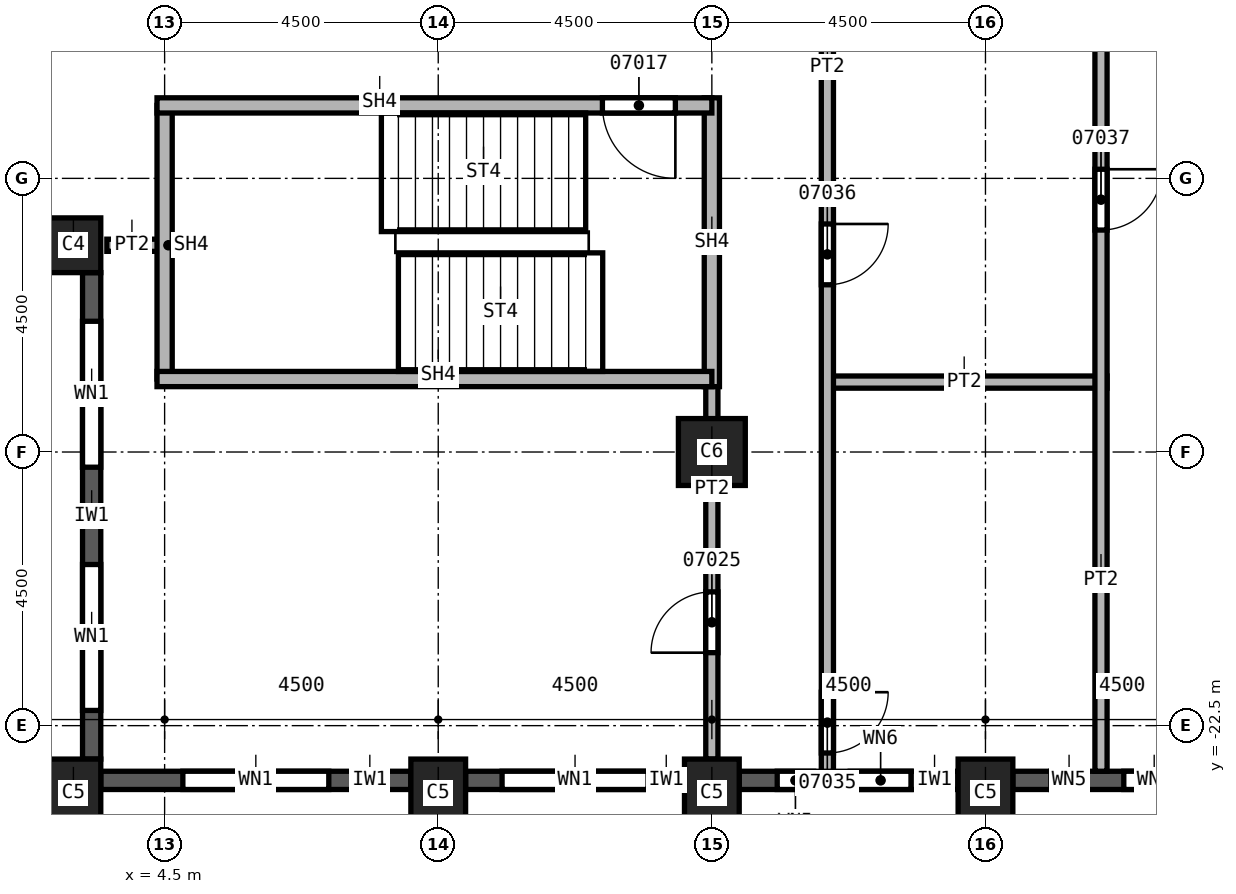
"""IFC4 building model, lengths in metres.
Left out: names, types, materials, properties, quantities, classifications, styles, units other than length and angle.
Written with IfcOpenShell. Run it as: python <this file> out.ifc"""

import sys

from ifc_helpers import new_model, si_unit, direction, frame, frame_2d, origin, origin_2d, place, context, subcontext, project, spatial, rectangle, extrude, element, fill, save


model = new_model("IFC4")
c1 = context("Model", 3, precision=1e-05, world=origin(), true_north=direction((0.0, 1.0)))
c2 = subcontext(c1, "Body", "Model", "MODEL_VIEW")
j1 = project(units=[si_unit("LENGTHUNIT", "METRE"), si_unit("PLANEANGLEUNIT", "RADIAN")], contexts=[c1])
p1 = place(None, origin())
s1 = spatial("IfcSite", under=j1, at=p1, CompositionType="ELEMENT")
p2 = place(p1, origin())
s2 = spatial("IfcBuilding", under=s1, at=p2, CompositionType="ELEMENT")
p3 = place(p2, frame((0.0, 0.0, 138.0)))
s3 = spatial("IfcBuildingStorey", under=s2, at=p3, CompositionType="ELEMENT", Elevation=138.0)
p4 = place(p3, frame((13.5, -18.0, 0.0), z_axis=(0.0, 0.0, 1.0), x_axis=(1.0, 0.0, 0.0)))
e1 = element("IfcColumn", 1, at=p4, inside=s3, PredefinedType="COLUMN", context=c2, shape_type="SweptSolid", body=[
    extrude(rectangle(XDim=1.1, YDim=1.1, at=origin_2d()), origin(), (0.0, 0.0, 1.0), 3.7),
])
for number, where, z_axis, x_axis in (
    (2, (3.0, -23.6, 0.0), (0.0, 0.0, 1.0), (1.0, 0.0, 0.0)),
    (3, (9.0, -23.6, 0.0), (0.0, 0.0, 1.0), (1.0, 0.0, 0.0)),
    (4, (13.5, -23.6, 0.0), (0.0, 0.0, 1.0), (1.0, 0.0, 0.0)),
    (5, (18.0, -23.6, 0.0), (0.0, 0.0, 1.0), (1.0, 0.0, 0.0)),
):
    element("IfcColumn", number, at=place(p3, frame(where, z_axis=z_axis, x_axis=x_axis)), inside=s3, PredefinedType="COLUMN", context=c2, shape_type="SweptSolid", body=[
        extrude(rectangle(XDim=0.9, YDim=1.1, at=origin_2d()), origin(), (0.0, 0.0, 1.0), 3.7),
    ])
p5 = place(p3, frame((3.0, -14.6, 0.0), z_axis=(0.0, 0.0, 1.0), x_axis=(1.0, 0.0, 0.0)))
e6 = element("IfcColumn", 6, at=p5, inside=s3, PredefinedType="COLUMN", context=c2, shape_type="SweptSolid", body=[
    extrude(rectangle(XDim=0.9, YDim=0.9, at=origin_2d()), origin(), (0.0, 0.0, 1.0), 3.7),
])
p6 = place(p3, frame((3.3, -15.05, 0.0), z_axis=(0.0, 0.0, 1.0), x_axis=(0.0, -1.0, 0.0)))
e7 = element("IfcWall", 7, at=p6, inside=s3, PredefinedType="SOLIDWALL", context=c2, shape_type="SweptSolid", body=[
    extrude(rectangle(XDim=8.0, YDim=0.3, at=frame_2d((4.0, 0.0))), origin(), (0.0, 0.0, 1.0), 3.1),
])
p7 = place(p6, frame((0.8, 0.0, 0.8)))
e8 = element("IfcOpeningElement", 8, at=p7, cuts=e7, PredefinedType="OPENING", context=c2, shape_type="SweptSolid", body=[
    extrude(rectangle(XDim=2.4, YDim=1.95, at=frame_2d((1.2, 0.975))), frame((0.0, 0.15, 0.0), z_axis=(0.0, -1.0, 0.0), x_axis=(1.0, 0.0, 0.0)), (0.0, 0.0, 1.0), 0.3),
])
p8 = place(p6, frame((4.8, 0.0, 0.8)))
e9 = element("IfcOpeningElement", 9, at=p8, cuts=e7, PredefinedType="OPENING", context=c2, shape_type="SweptSolid", body=[
    extrude(rectangle(XDim=2.4, YDim=1.95, at=frame_2d((1.2, 0.975))), frame((0.0, 0.15, 0.0), z_axis=(0.0, -1.0, 0.0), x_axis=(1.0, 0.0, 0.0)), (0.0, 0.0, 1.0), 0.3),
])
p9 = place(p3, frame((3.45, -23.4, 0.0), z_axis=(0.0, 0.0, 1.0), x_axis=(1.0, 0.0, 0.0)))
e10 = element("IfcWall", 10, at=p9, inside=s3, PredefinedType="SOLIDWALL", context=c2, shape_type="SweptSolid", body=[
    extrude(rectangle(XDim=5.1, YDim=0.3, at=frame_2d((2.55, 0.0))), origin(), (0.0, 0.0, 1.0), 3.1),
])
p10 = place(p9, frame((1.35, 0.0, 0.8)))
e11 = element("IfcOpeningElement", 11, at=p10, cuts=e10, PredefinedType="OPENING", context=c2, shape_type="SweptSolid", body=[
    extrude(rectangle(XDim=2.4, YDim=1.95, at=frame_2d((1.2, 0.975))), frame((0.0, 0.15, 0.0), z_axis=(0.0, -1.0, 0.0), x_axis=(1.0, 0.0, 0.0)), (0.0, 0.0, 1.0), 0.3),
])
p11 = place(p3, frame((9.45, -23.4, 0.0), z_axis=(0.0, 0.0, 1.0), x_axis=(1.0, 0.0, 0.0)))
e12 = element("IfcWall", 12, at=p11, inside=s3, PredefinedType="SOLIDWALL", context=c2, shape_type="SweptSolid", body=[
    extrude(rectangle(XDim=3.6, YDim=0.3, at=frame_2d((1.8, 0.0))), origin(), (0.0, 0.0, 1.0), 3.1),
])
p12 = place(p11, frame((0.6, 0.0, 0.8)))
e13 = element("IfcOpeningElement", 13, at=p12, cuts=e12, PredefinedType="OPENING", context=c2, shape_type="SweptSolid", body=[
    extrude(rectangle(XDim=2.4, YDim=1.95, at=frame_2d((1.2, 0.975))), frame((0.0, 0.15, 0.0), z_axis=(0.0, -1.0, 0.0), x_axis=(1.0, 0.0, 0.0)), (0.0, 0.0, 1.0), 0.3),
])
p13 = place(p3, frame((13.95, -23.4, 0.0), z_axis=(0.0, 0.0, 1.0), x_axis=(1.0, 0.0, 0.0)))
e14 = element("IfcWall", 14, at=p13, inside=s3, PredefinedType="SOLIDWALL", context=c2, shape_type="SweptSolid", body=[
    extrude(rectangle(XDim=3.6, YDim=0.3, at=frame_2d((1.8, 0.0))), origin(), (0.0, 0.0, 1.0), 3.1),
])
p14 = place(p13, frame((0.625, 0.0, 0.8)))
e15 = element("IfcOpeningElement", 15, at=p14, cuts=e14, PredefinedType="OPENING", context=c2, shape_type="SweptSolid", body=[
    extrude(rectangle(XDim=0.6, YDim=1.95, at=frame_2d((0.3, 0.975))), frame((0.0, 0.15, 0.0), z_axis=(0.0, -1.0, 0.0), x_axis=(1.0, 0.0, 0.0)), (0.0, 0.0, 1.0), 0.3),
])
p15 = place(p13, frame((1.825, 0.0, 0.8)))
e16 = element("IfcOpeningElement", 16, at=p15, cuts=e14, PredefinedType="OPENING", context=c2, shape_type="SweptSolid", body=[
    extrude(rectangle(XDim=1.0, YDim=1.95, at=frame_2d((0.5, 0.975))), frame((0.0, 0.15, 0.0), z_axis=(0.0, -1.0, 0.0), x_axis=(1.0, 0.0, 0.0)), (0.0, 0.0, 1.0), 0.3),
])
p16 = place(p3, frame((18.45, -23.4, 0.0), z_axis=(0.0, 0.0, 1.0), x_axis=(1.0, 0.0, 0.0)))
e17 = element("IfcWall", 17, at=p16, inside=s3, PredefinedType="SOLIDWALL", context=c2, shape_type="SweptSolid", body=[
    extrude(rectangle(XDim=3.6, YDim=0.3, at=frame_2d((1.8, 0.0))), origin(), (0.0, 0.0, 1.0), 3.1),
])
p17 = place(p16, frame((0.625, 0.0, 0.8)))
e18 = element("IfcOpeningElement", 18, at=p17, cuts=e17, PredefinedType="OPENING", context=c2, shape_type="SweptSolid", body=[
    extrude(rectangle(XDim=0.6, YDim=1.95, at=frame_2d((0.3, 0.975))), frame((0.0, 0.15, 0.0), z_axis=(0.0, -1.0, 0.0), x_axis=(1.0, 0.0, 0.0)), (0.0, 0.0, 1.0), 0.3),
])
p18 = place(p16, frame((1.825, 0.0, 0.8)))
e19 = element("IfcOpeningElement", 19, at=p18, cuts=e17, PredefinedType="OPENING", context=c2, shape_type="SweptSolid", body=[
    extrude(rectangle(XDim=1.0, YDim=1.95, at=frame_2d((0.5, 0.975))), frame((0.0, 0.15, 0.0), z_axis=(0.0, -1.0, 0.0), x_axis=(1.0, 0.0, 0.0)), (0.0, 0.0, 1.0), 0.3),
])
p19 = place(p3, frame((4.5, -14.6, 0.0), z_axis=(0.0, 0.0, 1.0), x_axis=(-1.0, 0.0, 0.0)))
e20 = element("IfcWall", 20, at=p19, inside=s3, PredefinedType="PARTITIONING", context=c2, shape_type="SweptSolid", body=[
    extrude(rectangle(XDim=0.95, YDim=0.2, at=frame_2d((0.475, 0.0))), origin(), (0.0, 0.0, 1.0), 3.7),
])
p20 = place(p3, frame((13.5, -23.05, 0.0), z_axis=(0.0, 0.0, 1.0), x_axis=(0.0, 1.0, 0.0)))
e21 = element("IfcWall", 21, at=p20, inside=s3, PredefinedType="PARTITIONING", context=c2, shape_type="SweptSolid", body=[
    extrude(rectangle(XDim=6.375, YDim=0.2, at=frame_2d((3.188, 0.0))), origin(), (0.0, 0.0, 1.0), 3.7),
])
p21 = place(p20, frame((1.75, 0.0, 0.0)))
e22 = element("IfcOpeningElement", 22, at=p21, cuts=e21, PredefinedType="OPENING", context=c2, shape_type="SweptSolid", body=[
    extrude(rectangle(XDim=1.0, YDim=2.1, at=frame_2d((0.5, 1.05))), frame((0.0, 0.1, 0.0), z_axis=(0.0, -1.0, 0.0), x_axis=(1.0, 0.0, 0.0)), (0.0, 0.0, 1.0), 0.2),
])
p22 = place(p3, frame((15.4, -16.85, 0.0), z_axis=(0.0, 0.0, 1.0), x_axis=(1.0, 0.0, 0.0)))
e23 = element("IfcWall", 23, at=p22, inside=s3, PredefinedType="PARTITIONING", context=c2, shape_type="SweptSolid", body=[
    extrude(rectangle(XDim=4.6, YDim=0.2, at=frame_2d((2.3, 0.0))), origin(), (0.0, 0.0, 1.0), 3.7),
])
p23 = place(p3, frame((15.4, -3.65, 0.0), z_axis=(0.0, 0.0, 1.0), x_axis=(0.0, -1.0, 0.0)))
e24 = element("IfcWall", 24, at=p23, inside=s3, PredefinedType="PARTITIONING", context=c2, shape_type="SweptSolid", body=[
    extrude(rectangle(XDim=19.6, YDim=0.2, at=frame_2d((9.8, 0.0))), origin(), (0.0, 0.0, 1.0), 3.7),
])
p24 = place(p23, frame((18.3, 0.0, 0.0)))
e25 = element("IfcOpeningElement", 25, at=p24, cuts=e24, PredefinedType="OPENING", context=c2, shape_type="SweptSolid", body=[
    extrude(rectangle(XDim=1.0, YDim=2.1, at=frame_2d((0.5, 1.05))), frame((0.0, 0.1, 0.0), z_axis=(0.0, -1.0, 0.0), x_axis=(1.0, 0.0, 0.0)), (0.0, 0.0, 1.0), 0.2),
])
p25 = place(p23, frame((10.6, 0.0, 0.0)))
e26 = element("IfcOpeningElement", 26, at=p25, cuts=e24, PredefinedType="OPENING", context=c2, shape_type="SweptSolid", body=[
    extrude(rectangle(XDim=1.0, YDim=2.1, at=frame_2d((0.5, 1.05))), frame((0.0, 0.1, 0.0), z_axis=(0.0, -1.0, 0.0), x_axis=(1.0, 0.0, 0.0)), (0.0, 0.0, 1.0), 0.2),
])
p26 = place(p23, frame((2.2, 0.0, 0.0)))
e27 = element("IfcOpeningElement", 27, at=p26, cuts=e24, PredefinedType="OPENING", context=c2, shape_type="SweptSolid", body=[
    extrude(rectangle(XDim=1.0, YDim=2.1, at=frame_2d((0.5, 1.05))), frame((0.0, 0.1, 0.0), z_axis=(0.0, -1.0, 0.0), x_axis=(1.0, 0.0, 0.0)), (0.0, 0.0, 1.0), 0.2),
])
p27 = place(p3, frame((19.9, -8.9, 0.0), z_axis=(0.0, 0.0, 1.0), x_axis=(0.0, -1.0, 0.0)))
e28 = element("IfcWall", 28, at=p27, inside=s3, PredefinedType="PARTITIONING", context=c2, shape_type="SweptSolid", body=[
    extrude(rectangle(XDim=14.35, YDim=0.2, at=frame_2d((7.175, 0.0))), origin(), (0.0, 0.0, 1.0), 3.7),
])
p28 = place(p27, frame((4.45, 0.0, 0.0)))
e29 = element("IfcOpeningElement", 29, at=p28, cuts=e28, PredefinedType="OPENING", context=c2, shape_type="SweptSolid", body=[
    extrude(rectangle(XDim=1.0, YDim=2.1, at=frame_2d((0.5, 1.05))), frame((0.0, 0.1, 0.0), z_axis=(0.0, -1.0, 0.0), x_axis=(1.0, 0.0, 0.0)), (0.0, 0.0, 1.0), 0.2),
])
p29 = place(p3, frame((4.5, -16.8, 0.0), z_axis=(0.0, 0.0, 1.0), x_axis=(0.0, 1.0, 0.0)))
e30 = element("IfcWall", 30, at=p29, inside=s3, PredefinedType="SOLIDWALL", context=c2, shape_type="SweptSolid", body=[
    extrude(rectangle(XDim=4.5, YDim=0.25, at=frame_2d((2.25, 0.0))), origin(), (0.0, 0.0, 1.0), 3.7),
])
p30 = place(p3, frame((13.5, -16.925, 0.0), z_axis=(0.0, 0.0, 1.0), x_axis=(0.0, 1.0, 0.0)))
e31 = element("IfcWall", 31, at=p30, inside=s3, PredefinedType="SOLIDWALL", context=c2, shape_type="SweptSolid", body=[
    extrude(rectangle(XDim=4.75, YDim=0.25, at=frame_2d((2.375, 0.0))), origin(), (0.0, 0.0, 1.0), 3.7),
])
p31 = place(p3, frame((13.5, -16.8, 0.0), z_axis=(0.0, 0.0, 1.0), x_axis=(-1.0, 0.0, 0.0)))
e32 = element("IfcWall", 32, at=p31, inside=s3, PredefinedType="SOLIDWALL", context=c2, shape_type="SweptSolid", body=[
    extrude(rectangle(XDim=9.125, YDim=0.25, at=frame_2d((4.562, 0.0))), origin(), (0.0, 0.0, 1.0), 3.7),
])
p32 = place(p3, frame((13.5, -12.3, 0.0), z_axis=(0.0, 0.0, 1.0), x_axis=(-1.0, 0.0, 0.0)))
e33 = element("IfcWall", 33, at=p32, inside=s3, PredefinedType="SOLIDWALL", context=c2, shape_type="SweptSolid", body=[
    extrude(rectangle(XDim=9.125, YDim=0.25, at=frame_2d((4.562, 0.0))), origin(), (0.0, 0.0, 1.0), 3.7),
])
p33 = place(p32, frame((0.6, 0.0, 0.0)))
e34 = element("IfcOpeningElement", 34, at=p33, cuts=e33, PredefinedType="OPENING", context=c2, shape_type="SweptSolid", body=[
    extrude(rectangle(XDim=1.2, YDim=2.1, at=frame_2d((0.6, 1.05))), frame((0.0, 0.125, 0.0), z_axis=(0.0, -1.0, 0.0), x_axis=(1.0, 0.0, 0.0)), (0.0, 0.0, 1.0), 0.25),
])
p34 = place(p7, origin())
e35 = element("IfcWindow", 35, at=p34, inside=s3, PartitioningType="SINGLE_PANEL", PredefinedType="WINDOW", context=c2, shape_type="SweptSolid", body=[
    extrude(rectangle(XDim=2.4, YDim=1.95, at=frame_2d((1.2, 0.975))), frame((0.0, 0.03, 0.0), z_axis=(0.0, -1.0, 0.0), x_axis=(1.0, 0.0, 0.0)), (0.0, 0.0, 1.0), 0.06),
])
fill(e8, e35)
p35 = place(p8, origin())
e36 = element("IfcWindow", 36, at=p35, inside=s3, PartitioningType="SINGLE_PANEL", PredefinedType="WINDOW", context=c2, shape_type="SweptSolid", body=[
    extrude(rectangle(XDim=2.4, YDim=1.95, at=frame_2d((1.2, 0.975))), frame((0.0, 0.03, 0.0), z_axis=(0.0, -1.0, 0.0), x_axis=(1.0, 0.0, 0.0)), (0.0, 0.0, 1.0), 0.06),
])
fill(e9, e36)
p36 = place(p10, origin())
e37 = element("IfcWindow", 37, at=p36, inside=s3, PartitioningType="SINGLE_PANEL", PredefinedType="WINDOW", context=c2, shape_type="SweptSolid", body=[
    extrude(rectangle(XDim=2.4, YDim=1.95, at=frame_2d((1.2, 0.975))), frame((0.0, 0.03, 0.0), z_axis=(0.0, -1.0, 0.0), x_axis=(1.0, 0.0, 0.0)), (0.0, 0.0, 1.0), 0.06),
])
fill(e11, e37)
p37 = place(p12, origin())
e38 = element("IfcWindow", 38, at=p37, inside=s3, PartitioningType="SINGLE_PANEL", PredefinedType="WINDOW", context=c2, shape_type="SweptSolid", body=[
    extrude(rectangle(XDim=2.4, YDim=1.95, at=frame_2d((1.2, 0.975))), frame((0.0, 0.03, 0.0), z_axis=(0.0, -1.0, 0.0), x_axis=(1.0, 0.0, 0.0)), (0.0, 0.0, 1.0), 0.06),
])
fill(e13, e38)
p38 = place(p33, origin())
e39 = element("IfcDoor", 39, at=p38, inside=s3, OperationType="SINGLE_SWING_RIGHT", PredefinedType="DOOR", context=c2, shape_type="SweptSolid", body=[
    extrude(rectangle(XDim=1.2, YDim=2.1, at=frame_2d((0.6, 1.05))), frame((0.0, 0.025, 0.0), z_axis=(0.0, -1.0, 0.0), x_axis=(1.0, 0.0, 0.0)), (0.0, 0.0, 1.0), 0.05),
])
fill(e34, e39)
p39 = place(p21, origin())
e40 = element("IfcDoor", 40, at=p39, inside=s3, OperationType="SINGLE_SWING_RIGHT", PredefinedType="DOOR", context=c2, shape_type="SweptSolid", body=[
    extrude(rectangle(XDim=1.0, YDim=2.1, at=frame_2d((0.5, 1.05))), frame((0.0, 0.025, 0.0), z_axis=(0.0, -1.0, 0.0), x_axis=(1.0, 0.0, 0.0)), (0.0, 0.0, 1.0), 0.05),
])
fill(e22, e40)
p40 = place(p24, origin())
e41 = element("IfcDoor", 41, at=p40, inside=s3, OperationType="SINGLE_SWING_RIGHT", PredefinedType="DOOR", context=c2, shape_type="SweptSolid", body=[
    extrude(rectangle(XDim=1.0, YDim=2.1, at=frame_2d((0.5, 1.05))), frame((0.0, 0.025, 0.0), z_axis=(0.0, -1.0, 0.0), x_axis=(1.0, 0.0, 0.0)), (0.0, 0.0, 1.0), 0.05),
])
fill(e25, e41)
p41 = place(p25, origin())
e42 = element("IfcDoor", 42, at=p41, inside=s3, OperationType="SINGLE_SWING_LEFT", PredefinedType="DOOR", context=c2, shape_type="SweptSolid", body=[
    extrude(rectangle(XDim=1.0, YDim=2.1, at=frame_2d((0.5, 1.05))), frame((0.0, 0.025, 0.0), z_axis=(0.0, -1.0, 0.0), x_axis=(1.0, 0.0, 0.0)), (0.0, 0.0, 1.0), 0.05),
])
fill(e26, e42)
p42 = place(p28, origin())
e43 = element("IfcDoor", 43, at=p42, inside=s3, OperationType="SINGLE_SWING_RIGHT", PredefinedType="DOOR", context=c2, shape_type="SweptSolid", body=[
    extrude(rectangle(XDim=1.0, YDim=2.1, at=frame_2d((0.5, 1.05))), frame((0.0, 0.025, 0.0), z_axis=(0.0, -1.0, 0.0), x_axis=(1.0, 0.0, 0.0)), (0.0, 0.0, 1.0), 0.05),
])
fill(e29, e43)
p43 = place(p14, origin())
e44 = element("IfcWindow", 44, at=p43, inside=s3, PartitioningType="SINGLE_PANEL", PredefinedType="WINDOW", context=c2, shape_type="SweptSolid", body=[
    extrude(rectangle(XDim=0.6, YDim=1.95, at=frame_2d((0.3, 0.975))), frame((0.0, 0.03, 0.0), z_axis=(0.0, -1.0, 0.0), x_axis=(1.0, 0.0, 0.0)), (0.0, 0.0, 1.0), 0.06),
])
fill(e15, e44)
p44 = place(p15, origin())
e45 = element("IfcWindow", 45, at=p44, inside=s3, PartitioningType="SINGLE_PANEL", PredefinedType="WINDOW", context=c2, shape_type="SweptSolid", body=[
    extrude(rectangle(XDim=1.0, YDim=1.95, at=frame_2d((0.5, 0.975))), frame((0.0, 0.03, 0.0), z_axis=(0.0, -1.0, 0.0), x_axis=(1.0, 0.0, 0.0)), (0.0, 0.0, 1.0), 0.06),
])
fill(e16, e45)
p45 = place(p17, origin())
e46 = element("IfcWindow", 46, at=p45, inside=s3, PartitioningType="SINGLE_PANEL", PredefinedType="WINDOW", context=c2, shape_type="SweptSolid", body=[
    extrude(rectangle(XDim=0.6, YDim=1.95, at=frame_2d((0.3, 0.975))), frame((0.0, 0.03, 0.0), z_axis=(0.0, -1.0, 0.0), x_axis=(1.0, 0.0, 0.0)), (0.0, 0.0, 1.0), 0.06),
])
fill(e18, e46)
p46 = place(p18, origin())
e47 = element("IfcWindow", 47, at=p46, inside=s3, PartitioningType="SINGLE_PANEL", PredefinedType="WINDOW", context=c2, shape_type="SweptSolid", body=[
    extrude(rectangle(XDim=1.0, YDim=1.95, at=frame_2d((0.5, 0.975))), frame((0.0, 0.03, 0.0), z_axis=(0.0, -1.0, 0.0), x_axis=(1.0, 0.0, 0.0)), (0.0, 0.0, 1.0), 0.06),
])
fill(e19, e47)
save(model, sys.argv[1])
